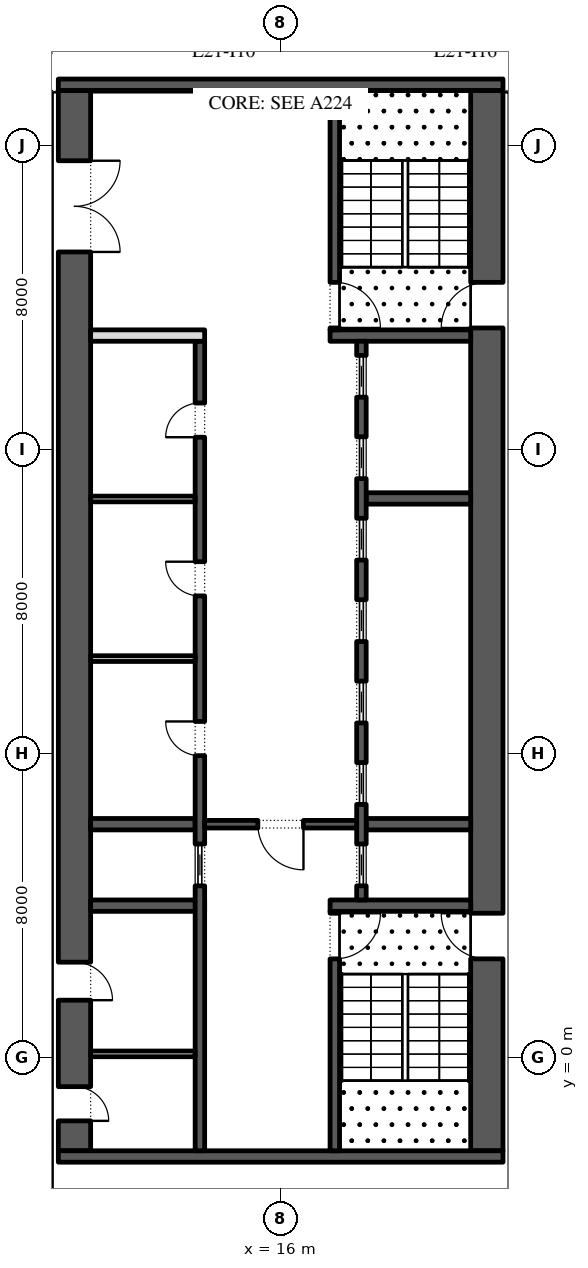
"""IFC4 building model, lengths in metres.
Left out: names, types, materials, properties, quantities, classifications, styles, units other than length and angle.
Written with IfcOpenShell. Run it as: python <this file> out.ifc"""

import sys

from ifc_helpers import new_model, si_unit, direction, frame, frame_2d, origin, place, context, subcontext, project, spatial, rectangle, extrude, element, fill, save


model = new_model("IFC4")
c1 = context("Model", 3, precision=1e-05, world=origin(), true_north=direction((0.0, 1.0)))
c2 = subcontext(c1, "Body", "Model", "MODEL_VIEW")
j1 = project(units=[si_unit("LENGTHUNIT", "METRE"), si_unit("PLANEANGLEUNIT", "RADIAN")], contexts=[c1])
p1 = place(None, origin())
s1 = spatial("IfcSite", under=j1, at=p1, CompositionType="ELEMENT")
p2 = place(p1, origin())
s2 = spatial("IfcBuilding", under=s1, at=p2, CompositionType="ELEMENT")
p3 = place(p2, frame((0.0, 0.0, 99.6)))
s3 = spatial("IfcBuildingStorey", under=s2, at=p3, CompositionType="ELEMENT", Elevation=99.6)
p4 = place(p3, frame((21.425, -2.45, 0.0), z_axis=(0.0, 0.0, 1.0), x_axis=(0.0, 1.0, 0.0)))
e1 = element("IfcWall", 1, at=p4, inside=s3, PredefinedType="SHEAR", context=c2, shape_type="SweptSolid", body=[
    extrude(rectangle(XDim=27.9, YDim=0.85, at=frame_2d((13.95, 0.0))), origin(), (0.0, 0.0, 1.0), 5.8),
])
p5 = place(p4, frame((5.05, 0.0, 0.0)))
e2 = element("IfcOpeningElement", 2, at=p5, cuts=e1, PredefinedType="OPENING", context=c2, shape_type="SweptSolid", body=[
    extrude(rectangle(XDim=1.2, YDim=2.1, at=frame_2d((0.6, 1.05))), frame((0.0, 0.435, 0.0), z_axis=(0.0, -1.0, 0.0), x_axis=(1.0, 0.0, 0.0)), (0.0, 0.0, 1.0), 0.87),
])
p6 = place(p4, frame((21.65, 0.0, 0.0)))
e3 = element("IfcOpeningElement", 3, at=p6, cuts=e1, PredefinedType="OPENING", context=c2, shape_type="SweptSolid", body=[
    extrude(rectangle(XDim=1.2, YDim=2.1, at=frame_2d((0.6, 1.05))), frame((0.0, 0.435, 0.0), z_axis=(0.0, -1.0, 0.0), x_axis=(1.0, 0.0, 0.0)), (0.0, 0.0, 1.0), 0.87),
])
p7 = place(p3, frame((10.575, -2.45, 0.0), z_axis=(0.0, 0.0, 1.0), x_axis=(0.0, 1.0, 0.0)))
e4 = element("IfcWall", 4, at=p7, inside=s3, PredefinedType="SHEAR", context=c2, shape_type="SweptSolid", body=[
    extrude(rectangle(XDim=27.9, YDim=0.85, at=frame_2d((13.95, 0.0))), origin(), (0.0, 0.0, 1.0), 5.8),
])
p8 = place(p7, frame((23.65, 0.0, 0.0)))
e5 = element("IfcOpeningElement", 5, at=p8, cuts=e4, PredefinedType="OPENING", context=c2, shape_type="SweptSolid", body=[
    extrude(rectangle(XDim=2.4, YDim=2.1, at=frame_2d((1.2, 1.05))), frame((0.0, 0.435, 0.0), z_axis=(0.0, -1.0, 0.0), x_axis=(1.0, 0.0, 0.0)), (0.0, 0.0, 1.0), 0.87),
])
p9 = place(p7, frame((0.788, 0.0, 0.0)))
e6 = element("IfcOpeningElement", 6, at=p9, cuts=e4, PredefinedType="OPENING", context=c2, shape_type="SweptSolid", body=[
    extrude(rectangle(XDim=0.9, YDim=2.1, at=frame_2d((0.45, 1.05))), frame((0.0, 0.435, 0.0), z_axis=(0.0, -1.0, 0.0), x_axis=(1.0, 0.0, 0.0)), (0.0, 0.0, 1.0), 0.87),
])
p10 = place(p7, frame((3.962, 0.0, 0.0)))
e7 = element("IfcOpeningElement", 7, at=p10, cuts=e4, PredefinedType="OPENING", context=c2, shape_type="SweptSolid", body=[
    extrude(rectangle(XDim=1.0, YDim=2.1, at=frame_2d((0.5, 1.05))), frame((0.0, 0.435, 0.0), z_axis=(0.0, -1.0, 0.0), x_axis=(1.0, 0.0, 0.0)), (0.0, 0.0, 1.0), 0.87),
])
for number, where, z_axis, x_axis in (
    (8, (10.15, -2.6, 0.0), (0.0, 0.0, 1.0), (1.0, 0.0, 0.0)),
    (9, (10.15, 25.6, 0.0), (0.0, 0.0, 1.0), (1.0, 0.0, 0.0)),
):
    element("IfcWall", number, at=place(p3, frame(where, z_axis=z_axis, x_axis=x_axis)), inside=s3, PredefinedType="SHEAR", context=c2, shape_type="SweptSolid", body=[
        extrude(rectangle(XDim=11.7, YDim=0.3, at=frame_2d((5.85, 0.0))), origin(), (0.0, 0.0, 1.0), 5.8),
    ])
p11 = place(p3, frame((17.3, 4.0, 0.0), z_axis=(0.0, 0.0, 1.0), x_axis=(1.0, 0.0, 0.0)))
e10 = element("IfcWall", 10, at=p11, inside=s3, PredefinedType="SHEAR", context=c2, shape_type="SweptSolid", body=[
    extrude(rectangle(XDim=3.7, YDim=0.3, at=frame_2d((1.85, 0.0))), origin(), (0.0, 0.0, 1.0), 5.8),
])
p12 = place(p3, frame((17.425, -2.45, 0.0), z_axis=(0.0, 0.0, 1.0), x_axis=(0.0, 1.0, 0.0)))
e11 = element("IfcWall", 11, at=p12, inside=s3, PredefinedType="SHEAR", context=c2, shape_type="SweptSolid", body=[
    extrude(rectangle(XDim=6.3, YDim=0.25, at=frame_2d((3.15, 0.0))), origin(), (0.0, 0.0, 1.0), 5.8),
])
p13 = place(p12, frame((5.05, 0.0, 0.0)))
e12 = element("IfcOpeningElement", 12, at=p13, cuts=e11, PredefinedType="OPENING", context=c2, shape_type="SweptSolid", body=[
    extrude(rectangle(XDim=1.2, YDim=2.1, at=frame_2d((0.6, 1.05))), frame((0.0, 0.135, 0.0), z_axis=(0.0, -1.0, 0.0), x_axis=(1.0, 0.0, 0.0)), (0.0, 0.0, 1.0), 0.27),
])
p14 = place(p3, frame((17.3, 19.0, 0.0), z_axis=(0.0, 0.0, 1.0), x_axis=(1.0, 0.0, 0.0)))
e13 = element("IfcWall", 13, at=p14, inside=s3, PredefinedType="SHEAR", context=c2, shape_type="SweptSolid", body=[
    extrude(rectangle(XDim=3.7, YDim=0.3, at=frame_2d((1.85, 0.0))), origin(), (0.0, 0.0, 1.0), 5.8),
])
p15 = place(p3, frame((17.425, 19.15, 0.0), z_axis=(0.0, 0.0, 1.0), x_axis=(0.0, 1.0, 0.0)))
e14 = element("IfcWall", 14, at=p15, inside=s3, PredefinedType="SHEAR", context=c2, shape_type="SweptSolid", body=[
    extrude(rectangle(XDim=6.3, YDim=0.25, at=frame_2d((3.15, 0.0))), origin(), (0.0, 0.0, 1.0), 5.8),
])
p16 = place(p15, frame((0.05, 0.0, 0.0)))
e15 = element("IfcOpeningElement", 15, at=p16, cuts=e14, PredefinedType="OPENING", context=c2, shape_type="SweptSolid", body=[
    extrude(rectangle(XDim=1.2, YDim=2.1, at=frame_2d((0.6, 1.05))), frame((0.0, 0.135, 0.0), z_axis=(0.0, -1.0, 0.0), x_axis=(1.0, 0.0, 0.0)), (0.0, 0.0, 1.0), 0.27),
])
for number, where, z_axis, x_axis in (
    (16, (18.25, 6.143, 0.0), (0.0, 0.0, 1.0), (1.0, 0.0, 0.0)),
    (17, (18.25, 14.714, 0.0), (0.0, 0.0, 1.0), (1.0, 0.0, 0.0)),
):
    element("IfcWall", number, at=place(p3, frame(where, z_axis=z_axis, x_axis=x_axis)), inside=s3, PredefinedType="SHEAR", context=c2, shape_type="SweptSolid", body=[
        extrude(rectangle(XDim=2.75, YDim=0.3, at=frame_2d((1.375, 0.0))), origin(), (0.0, 0.0, 1.0), 5.8),
    ])
p17 = place(p3, frame((18.125, 4.15, 0.0), z_axis=(0.0, 0.0, 1.0), x_axis=(0.0, 1.0, 0.0)))
e18 = element("IfcWall", 18, at=p17, inside=s3, PredefinedType="SHEAR", context=c2, shape_type="SweptSolid", body=[
    extrude(rectangle(XDim=14.7, YDim=0.25, at=frame_2d((7.35, 0.0))), origin(), (0.0, 0.0, 1.0), 5.8),
])
p18 = place(p17, frame((0.371, 0.0, 0.0)))
e19 = element("IfcOpeningElement", 19, at=p18, cuts=e18, PredefinedType="OPENING", context=c2, shape_type="SweptSolid", body=[
    extrude(rectangle(XDim=1.1, YDim=2.1, at=frame_2d((0.55, 1.05))), frame((0.0, 0.135, 0.0), z_axis=(0.0, -1.0, 0.0), x_axis=(1.0, 0.0, 0.0)), (0.0, 0.0, 1.0), 0.27),
])
p19 = place(p17, frame((2.514, 0.0, 0.0)))
e20 = element("IfcOpeningElement", 20, at=p19, cuts=e18, PredefinedType="OPENING", context=c2, shape_type="SweptSolid", body=[
    extrude(rectangle(XDim=1.1, YDim=2.1, at=frame_2d((0.55, 1.05))), frame((0.0, 0.135, 0.0), z_axis=(0.0, -1.0, 0.0), x_axis=(1.0, 0.0, 0.0)), (0.0, 0.0, 1.0), 0.27),
])
p20 = place(p17, frame((4.657, 0.0, 0.0)))
e21 = element("IfcOpeningElement", 21, at=p20, cuts=e18, PredefinedType="OPENING", context=c2, shape_type="SweptSolid", body=[
    extrude(rectangle(XDim=1.1, YDim=2.1, at=frame_2d((0.55, 1.05))), frame((0.0, 0.135, 0.0), z_axis=(0.0, -1.0, 0.0), x_axis=(1.0, 0.0, 0.0)), (0.0, 0.0, 1.0), 0.27),
])
p21 = place(p17, frame((6.8, 0.0, 0.0)))
e22 = element("IfcOpeningElement", 22, at=p21, cuts=e18, PredefinedType="OPENING", context=c2, shape_type="SweptSolid", body=[
    extrude(rectangle(XDim=1.1, YDim=2.1, at=frame_2d((0.55, 1.05))), frame((0.0, 0.135, 0.0), z_axis=(0.0, -1.0, 0.0), x_axis=(1.0, 0.0, 0.0)), (0.0, 0.0, 1.0), 0.27),
])
p22 = place(p17, frame((8.943, 0.0, 0.0)))
e23 = element("IfcOpeningElement", 23, at=p22, cuts=e18, PredefinedType="OPENING", context=c2, shape_type="SweptSolid", body=[
    extrude(rectangle(XDim=1.1, YDim=2.1, at=frame_2d((0.55, 1.05))), frame((0.0, 0.135, 0.0), z_axis=(0.0, -1.0, 0.0), x_axis=(1.0, 0.0, 0.0)), (0.0, 0.0, 1.0), 0.27),
])
p23 = place(p17, frame((11.086, 0.0, 0.0)))
e24 = element("IfcOpeningElement", 24, at=p23, cuts=e18, PredefinedType="OPENING", context=c2, shape_type="SweptSolid", body=[
    extrude(rectangle(XDim=1.1, YDim=2.1, at=frame_2d((0.55, 1.05))), frame((0.0, 0.135, 0.0), z_axis=(0.0, -1.0, 0.0), x_axis=(1.0, 0.0, 0.0)), (0.0, 0.0, 1.0), 0.27),
])
p24 = place(p17, frame((13.229, 0.0, 0.0)))
e25 = element("IfcOpeningElement", 25, at=p24, cuts=e18, PredefinedType="OPENING", context=c2, shape_type="SweptSolid", body=[
    extrude(rectangle(XDim=1.1, YDim=2.1, at=frame_2d((0.55, 1.05))), frame((0.0, 0.135, 0.0), z_axis=(0.0, -1.0, 0.0), x_axis=(1.0, 0.0, 0.0)), (0.0, 0.0, 1.0), 0.27),
])
p25 = place(p3, frame((11.0, 4.0, 0.0), z_axis=(0.0, 0.0, 1.0), x_axis=(1.0, 0.0, 0.0)))
e26 = element("IfcWall", 26, at=p25, inside=s3, PredefinedType="SHEAR", context=c2, shape_type="SweptSolid", body=[
    extrude(rectangle(XDim=3.0, YDim=0.3, at=frame_2d((1.5, 0.0))), origin(), (0.0, 0.0, 1.0), 5.8),
])
p26 = place(p3, frame((11.0, 6.143, 0.0), z_axis=(0.0, 0.0, 1.0), x_axis=(1.0, 0.0, 0.0)))
e27 = element("IfcWall", 27, at=p26, inside=s3, PredefinedType="SHEAR", context=c2, shape_type="SweptSolid", body=[
    extrude(rectangle(XDim=2.75, YDim=0.3, at=frame_2d((1.375, 0.0))), origin(), (0.0, 0.0, 1.0), 5.8),
])
p27 = place(p3, frame((13.875, -2.45, 0.0), z_axis=(0.0, 0.0, 1.0), x_axis=(0.0, 1.0, 0.0)))
e28 = element("IfcWall", 28, at=p27, inside=s3, PredefinedType="SHEAR", context=c2, shape_type="SweptSolid", body=[
    extrude(rectangle(XDim=21.3, YDim=0.25, at=frame_2d((10.65, 0.0))), origin(), (0.0, 0.0, 1.0), 5.8),
])
p28 = place(p27, frame((10.396, 0.0, 0.0)))
e29 = element("IfcOpeningElement", 29, at=p28, cuts=e28, PredefinedType="OPENING", context=c2, shape_type="SweptSolid", body=[
    extrude(rectangle(XDim=0.9, YDim=2.1, at=frame_2d((0.45, 1.05))), frame((0.0, 0.135, 0.0), z_axis=(0.0, -1.0, 0.0), x_axis=(1.0, 0.0, 0.0)), (0.0, 0.0, 1.0), 0.27),
])
p29 = place(p27, frame((14.6, 0.0, 0.0)))
e30 = element("IfcOpeningElement", 30, at=p29, cuts=e28, PredefinedType="OPENING", context=c2, shape_type="SweptSolid", body=[
    extrude(rectangle(XDim=0.9, YDim=2.1, at=frame_2d((0.45, 1.05))), frame((0.0, 0.135, 0.0), z_axis=(0.0, -1.0, 0.0), x_axis=(1.0, 0.0, 0.0)), (0.0, 0.0, 1.0), 0.27),
])
p30 = place(p27, frame((18.775, 0.0, 0.0)))
e31 = element("IfcOpeningElement", 31, at=p30, cuts=e28, PredefinedType="OPENING", context=c2, shape_type="SweptSolid", body=[
    extrude(rectangle(XDim=0.9, YDim=2.1, at=frame_2d((0.45, 1.05))), frame((0.0, 0.135, 0.0), z_axis=(0.0, -1.0, 0.0), x_axis=(1.0, 0.0, 0.0)), (0.0, 0.0, 1.0), 0.27),
])
p31 = place(p27, frame((6.971, 0.0, 0.0)))
e32 = element("IfcOpeningElement", 32, at=p31, cuts=e28, PredefinedType="OPENING", context=c2, shape_type="SweptSolid", body=[
    extrude(rectangle(XDim=1.1, YDim=2.1, at=frame_2d((0.55, 1.05))), frame((0.0, 0.135, 0.0), z_axis=(0.0, -1.0, 0.0), x_axis=(1.0, 0.0, 0.0)), (0.0, 0.0, 1.0), 0.27),
])
p32 = place(p3, frame((11.0, 19.0, 0.0), z_axis=(0.0, 0.0, 1.0), x_axis=(1.0, 0.0, 0.0)))
e33 = element("IfcWall", 33, at=p32, inside=s3, PredefinedType="PARTITIONING", context=c2, shape_type="SweptSolid", body=[
    extrude(rectangle(XDim=3.0, YDim=0.3, at=frame_2d((1.5, 0.0))), origin(), (0.0, 0.0, 1.0), 5.8),
])
for number, where, z_axis, x_axis in (
    (34, (11.0, 10.5, 0.0), (0.0, 0.0, 1.0), (1.0, 0.0, 0.0)),
    (35, (11.0, 14.7, 0.0), (0.0, 0.0, 1.0), (1.0, 0.0, 0.0)),
):
    element("IfcWall", number, at=place(p3, frame(where, z_axis=z_axis, x_axis=x_axis)), inside=s3, PredefinedType="PARTITIONING", context=c2, shape_type="SweptSolid", body=[
        extrude(rectangle(XDim=2.75, YDim=0.15, at=frame_2d((1.375, 0.0))), origin(), (0.0, 0.0, 1.0), 5.8),
    ])
p33 = place(p3, frame((14.0, 6.143, 0.0), z_axis=(0.0, 0.0, 1.0), x_axis=(1.0, 0.0, 0.0)))
e36 = element("IfcWall", 36, at=p33, inside=s3, PredefinedType="SHEAR", context=c2, shape_type="SweptSolid", body=[
    extrude(rectangle(XDim=4.0, YDim=0.2, at=frame_2d((2.0, 0.0))), origin(), (0.0, 0.0, 1.0), 5.8),
])
p34 = place(p33, frame((1.4, 0.0, 0.0)))
e37 = element("IfcOpeningElement", 37, at=p34, cuts=e36, PredefinedType="OPENING", context=c2, shape_type="SweptSolid", body=[
    extrude(rectangle(XDim=1.2, YDim=2.1, at=frame_2d((0.6, 1.05))), frame((0.0, 0.11, 0.0), z_axis=(0.0, -1.0, 0.0), x_axis=(1.0, 0.0, 0.0)), (0.0, 0.0, 1.0), 0.22),
])
p35 = place(p3, frame((11.0, 0.1, 0.0), z_axis=(0.0, 0.0, 1.0), x_axis=(1.0, 0.0, 0.0)))
e38 = element("IfcWall", 38, at=p35, inside=s3, PredefinedType="PARTITIONING", context=c2, shape_type="SweptSolid", body=[
    extrude(rectangle(XDim=2.75, YDim=0.15, at=frame_2d((1.375, 0.0))), origin(), (0.0, 0.0, 1.0), 5.8),
])
p36 = place(p18, origin())
e39 = element("IfcDoor", 39, at=p36, inside=s3, OperationType="SLIDING_TO_LEFT", PredefinedType="DOOR", context=c2, shape_type="SweptSolid", body=[
    extrude(rectangle(XDim=1.1, YDim=2.1, at=frame_2d((0.55, 1.05))), frame((0.0, 0.025, 0.0), z_axis=(0.0, -1.0, 0.0), x_axis=(1.0, 0.0, 0.0)), (0.0, 0.0, 1.0), 0.05),
])
fill(e19, e39)
p37 = place(p19, origin())
e40 = element("IfcDoor", 40, at=p37, inside=s3, OperationType="SLIDING_TO_LEFT", PredefinedType="DOOR", context=c2, shape_type="SweptSolid", body=[
    extrude(rectangle(XDim=1.1, YDim=2.1, at=frame_2d((0.55, 1.05))), frame((0.0, 0.025, 0.0), z_axis=(0.0, -1.0, 0.0), x_axis=(1.0, 0.0, 0.0)), (0.0, 0.0, 1.0), 0.05),
])
fill(e20, e40)
p38 = place(p20, origin())
e41 = element("IfcDoor", 41, at=p38, inside=s3, OperationType="SLIDING_TO_LEFT", PredefinedType="DOOR", context=c2, shape_type="SweptSolid", body=[
    extrude(rectangle(XDim=1.1, YDim=2.1, at=frame_2d((0.55, 1.05))), frame((0.0, 0.025, 0.0), z_axis=(0.0, -1.0, 0.0), x_axis=(1.0, 0.0, 0.0)), (0.0, 0.0, 1.0), 0.05),
])
fill(e21, e41)
p39 = place(p21, origin())
e42 = element("IfcDoor", 42, at=p39, inside=s3, OperationType="SLIDING_TO_LEFT", PredefinedType="DOOR", context=c2, shape_type="SweptSolid", body=[
    extrude(rectangle(XDim=1.1, YDim=2.1, at=frame_2d((0.55, 1.05))), frame((0.0, 0.025, 0.0), z_axis=(0.0, -1.0, 0.0), x_axis=(1.0, 0.0, 0.0)), (0.0, 0.0, 1.0), 0.05),
])
fill(e22, e42)
p40 = place(p22, origin())
e43 = element("IfcDoor", 43, at=p40, inside=s3, OperationType="SLIDING_TO_LEFT", PredefinedType="DOOR", context=c2, shape_type="SweptSolid", body=[
    extrude(rectangle(XDim=1.1, YDim=2.1, at=frame_2d((0.55, 1.05))), frame((0.0, 0.025, 0.0), z_axis=(0.0, -1.0, 0.0), x_axis=(1.0, 0.0, 0.0)), (0.0, 0.0, 1.0), 0.05),
])
fill(e23, e43)
p41 = place(p23, origin())
e44 = element("IfcDoor", 44, at=p41, inside=s3, OperationType="SLIDING_TO_LEFT", PredefinedType="DOOR", context=c2, shape_type="SweptSolid", body=[
    extrude(rectangle(XDim=1.1, YDim=2.1, at=frame_2d((0.55, 1.05))), frame((0.0, 0.025, 0.0), z_axis=(0.0, -1.0, 0.0), x_axis=(1.0, 0.0, 0.0)), (0.0, 0.0, 1.0), 0.05),
])
fill(e24, e44)
p42 = place(p24, origin())
e45 = element("IfcDoor", 45, at=p42, inside=s3, OperationType="SLIDING_TO_LEFT", PredefinedType="DOOR", context=c2, shape_type="SweptSolid", body=[
    extrude(rectangle(XDim=1.1, YDim=2.1, at=frame_2d((0.55, 1.05))), frame((0.0, 0.025, 0.0), z_axis=(0.0, -1.0, 0.0), x_axis=(1.0, 0.0, 0.0)), (0.0, 0.0, 1.0), 0.05),
])
fill(e25, e45)
p43 = place(p28, origin())
e46 = element("IfcDoor", 46, at=p43, inside=s3, OperationType="SINGLE_SWING_LEFT", PredefinedType="DOOR", context=c2, shape_type="SweptSolid", body=[
    extrude(rectangle(XDim=0.9, YDim=2.1, at=frame_2d((0.45, 1.05))), frame((0.0, 0.125, 0.0), z_axis=(0.0, -1.0, 0.0), x_axis=(1.0, 0.0, 0.0)), (0.0, 0.0, 1.0), 0.05),
])
fill(e29, e46)
p44 = place(p29, origin())
e47 = element("IfcDoor", 47, at=p44, inside=s3, OperationType="SINGLE_SWING_LEFT", PredefinedType="DOOR", context=c2, shape_type="SweptSolid", body=[
    extrude(rectangle(XDim=0.9, YDim=2.1, at=frame_2d((0.45, 1.05))), frame((0.0, 0.125, 0.0), z_axis=(0.0, -1.0, 0.0), x_axis=(1.0, 0.0, 0.0)), (0.0, 0.0, 1.0), 0.05),
])
fill(e30, e47)
p45 = place(p30, origin())
e48 = element("IfcDoor", 48, at=p45, inside=s3, OperationType="SINGLE_SWING_RIGHT", PredefinedType="DOOR", context=c2, shape_type="SweptSolid", body=[
    extrude(rectangle(XDim=0.9, YDim=2.1, at=frame_2d((0.45, 1.05))), frame((0.0, 0.125, 0.0), z_axis=(0.0, -1.0, 0.0), x_axis=(1.0, 0.0, 0.0)), (0.0, 0.0, 1.0), 0.05),
])
fill(e31, e48)
p46 = place(p31, origin())
e49 = element("IfcDoor", 49, at=p46, inside=s3, OperationType="SLIDING_TO_LEFT", PredefinedType="DOOR", context=c2, shape_type="SweptSolid", body=[
    extrude(rectangle(XDim=1.1, YDim=2.1, at=frame_2d((0.55, 1.05))), frame((0.0, 0.025, 0.0), z_axis=(0.0, -1.0, 0.0), x_axis=(1.0, 0.0, 0.0)), (0.0, 0.0, 1.0), 0.05),
])
fill(e32, e49)
p47 = place(p34, frame((1.2, 0.0, 0.0), z_axis=(0.0, 0.0, 1.0), x_axis=(-1.0, 0.0, 0.0)))
e50 = element("IfcDoor", 50, at=p47, inside=s3, OperationType="SINGLE_SWING_RIGHT", PredefinedType="DOOR", context=c2, shape_type="SweptSolid", body=[
    extrude(rectangle(XDim=1.2, YDim=2.1, at=frame_2d((0.6, 1.05))), frame((0.0, 0.025, 0.0), z_axis=(0.0, -1.0, 0.0), x_axis=(1.0, 0.0, 0.0)), (0.0, 0.0, 1.0), 0.05),
])
fill(e37, e50)
p48 = place(p8, frame((2.4, 0.0, 0.0), z_axis=(0.0, 0.0, 1.0), x_axis=(-1.0, 0.0, 0.0)))
e51 = element("IfcDoor", 51, at=p48, inside=s3, OperationType="DOUBLE_DOOR_SINGLE_SWING", PredefinedType="DOOR", context=c2, shape_type="SweptSolid", body=[
    extrude(rectangle(XDim=2.4, YDim=2.1, at=frame_2d((1.2, 1.05))), frame((0.0, 0.025, 0.0), z_axis=(0.0, -1.0, 0.0), x_axis=(1.0, 0.0, 0.0)), (0.0, 0.0, 1.0), 0.05),
])
fill(e5, e51)
p49 = place(p13, frame((1.2, 0.0, 0.0), z_axis=(0.0, 0.0, 1.0), x_axis=(-1.0, 0.0, 0.0)))
e52 = element("IfcDoor", 52, at=p49, inside=s3, OperationType="SINGLE_SWING_RIGHT", PredefinedType="DOOR", context=c2, shape_type="SweptSolid", body=[
    extrude(rectangle(XDim=1.2, YDim=2.1, at=frame_2d((0.6, 1.05))), frame((0.0, 0.025, 0.0), z_axis=(0.0, -1.0, 0.0), x_axis=(1.0, 0.0, 0.0)), (0.0, 0.0, 1.0), 0.05),
])
fill(e12, e52)
p50 = place(p5, origin())
e53 = element("IfcDoor", 53, at=p50, inside=s3, OperationType="SINGLE_SWING_LEFT", PredefinedType="DOOR", context=c2, shape_type="SweptSolid", body=[
    extrude(rectangle(XDim=1.2, YDim=2.1, at=frame_2d((0.6, 1.05))), frame((0.0, 0.025, 0.0), z_axis=(0.0, -1.0, 0.0), x_axis=(1.0, 0.0, 0.0)), (0.0, 0.0, 1.0), 0.05),
])
fill(e2, e53)
p51 = place(p16, frame((1.2, 0.0, 0.0), z_axis=(0.0, 0.0, 1.0), x_axis=(-1.0, 0.0, 0.0)))
e54 = element("IfcDoor", 54, at=p51, inside=s3, OperationType="SINGLE_SWING_LEFT", PredefinedType="DOOR", context=c2, shape_type="SweptSolid", body=[
    extrude(rectangle(XDim=1.2, YDim=2.1, at=frame_2d((0.6, 1.05))), frame((0.0, 0.025, 0.0), z_axis=(0.0, -1.0, 0.0), x_axis=(1.0, 0.0, 0.0)), (0.0, 0.0, 1.0), 0.05),
])
fill(e15, e54)
p52 = place(p6, origin())
e55 = element("IfcDoor", 55, at=p52, inside=s3, OperationType="SINGLE_SWING_RIGHT", PredefinedType="DOOR", context=c2, shape_type="SweptSolid", body=[
    extrude(rectangle(XDim=1.2, YDim=2.1, at=frame_2d((0.6, 1.05))), frame((0.0, 0.025, 0.0), z_axis=(0.0, -1.0, 0.0), x_axis=(1.0, 0.0, 0.0)), (0.0, 0.0, 1.0), 0.05),
])
fill(e3, e55)
p53 = place(p9, frame((0.9, -0.8, 0.0), z_axis=(0.0, 0.0, 1.0), x_axis=(-1.0, 0.0, 0.0)))
e56 = element("IfcDoor", 56, at=p53, inside=s3, OperationType="SINGLE_SWING_LEFT", PredefinedType="DOOR", context=c2, shape_type="SweptSolid", body=[
    extrude(rectangle(XDim=0.9, YDim=2.1, at=frame_2d((0.45, 1.05))), frame((0.0, -0.375, 0.0), z_axis=(0.0, -1.0, 0.0), x_axis=(1.0, 0.0, 0.0)), (0.0, 0.0, 1.0), 0.05),
])
fill(e6, e56)
p54 = place(p10, frame((1.0, -0.8, 0.0), z_axis=(0.0, 0.0, 1.0), x_axis=(-1.0, 0.0, 0.0)))
e57 = element("IfcDoor", 57, at=p54, inside=s3, OperationType="SINGLE_SWING_LEFT", PredefinedType="DOOR", context=c2, shape_type="SweptSolid", body=[
    extrude(rectangle(XDim=1.0, YDim=2.1, at=frame_2d((0.5, 1.05))), frame((0.0, -0.375, 0.0), z_axis=(0.0, -1.0, 0.0), x_axis=(1.0, 0.0, 0.0)), (0.0, 0.0, 1.0), 0.05),
])
fill(e7, e57)
save(model, sys.argv[1])
